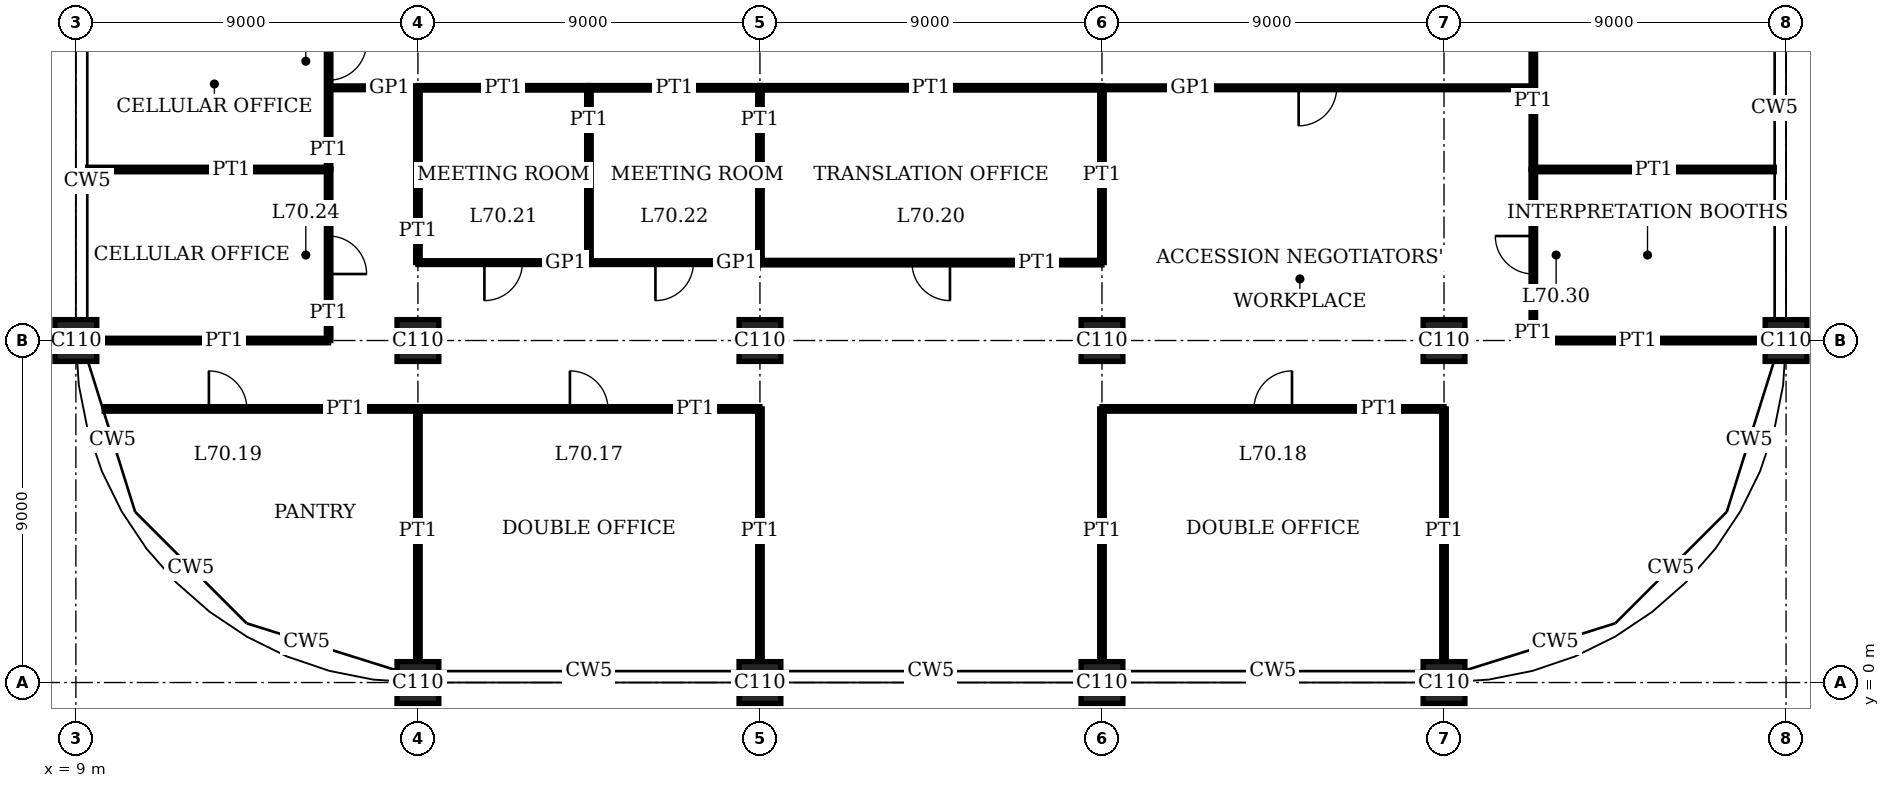
"""IFC4 building model, lengths in metres.
Left out: names, types, materials, properties, quantities, classifications, styles, units other than length and angle.
Written with IfcOpenShell. Run it as: python <this file> out.ifc"""

import sys

from ifc_helpers import new_model, si_unit, direction, frame, frame_2d, origin, origin_2d, place, context, subcontext, project, spatial, rectangle, extrude, element, fill, save


model = new_model("IFC4")
c1 = context("Model", 3, precision=1e-05, world=origin(), true_north=direction((0.0, 1.0)))
c2 = subcontext(c1, "Body", "Model", "MODEL_VIEW")
j1 = project(units=[si_unit("LENGTHUNIT", "METRE"), si_unit("PLANEANGLEUNIT", "RADIAN")], contexts=[c1])
p1 = place(None, origin())
s1 = spatial("IfcSite", under=j1, at=p1, CompositionType="ELEMENT")
p2 = place(p1, origin())
s2 = spatial("IfcBuilding", under=s1, at=p2, CompositionType="ELEMENT")
p3 = place(p2, frame((0.0, 0.0, 287.4)))
s3 = spatial("IfcBuildingStorey", under=s2, at=p3, CompositionType="ELEMENT", Elevation=287.4)
for number, where, z_axis, x_axis in (
    (1, (9.0, 9.0, 0.0), (0.0, 0.0, 1.0), (1.0, 0.0, 0.0)),
    (2, (18.0, 0.0, 0.0), (0.0, 0.0, 1.0), (1.0, 0.0, 0.0)),
    (3, (18.0, 9.0, 0.0), (0.0, 0.0, 1.0), (1.0, 0.0, 0.0)),
    (4, (27.0, 0.0, 0.0), (0.0, 0.0, 1.0), (1.0, 0.0, 0.0)),
    (5, (27.0, 9.0, 0.0), (0.0, 0.0, 1.0), (1.0, 0.0, 0.0)),
    (6, (36.0, 0.0, 0.0), (0.0, 0.0, 1.0), (1.0, 0.0, 0.0)),
    (7, (36.0, 9.0, 0.0), (0.0, 0.0, 1.0), (1.0, 0.0, 0.0)),
    (8, (45.0, 0.0, 0.0), (0.0, 0.0, 1.0), (1.0, 0.0, 0.0)),
    (9, (45.0, 9.0, 0.0), (0.0, 0.0, 1.0), (1.0, 0.0, 0.0)),
    (10, (54.0, 9.0, 0.0), (0.0, 0.0, 1.0), (1.0, 0.0, 0.0)),
):
    element("IfcColumn", number, at=place(p3, frame(where, z_axis=z_axis, x_axis=x_axis)), inside=s3, PredefinedType="COLUMN", context=c2, shape_type="SweptSolid", body=[
        extrude(rectangle(XDim=1.1, YDim=1.1, at=origin_2d()), origin(), (0.0, 0.0, 1.0), 4.0),
    ])
p4 = place(p3, frame((18.0, 7.2, 0.0), z_axis=(0.0, 0.0, 1.0), x_axis=(1.0, 0.0, 0.0)))
e11 = element("IfcWall", 11, at=p4, inside=s3, PredefinedType="PARTITIONING", context=c2, shape_type="SweptSolid", body=[
    extrude(rectangle(XDim=9.0, YDim=0.12, at=frame_2d((4.5, 0.0))), origin(), (0.0, 0.0, 1.0), 3.75),
])
p5 = place(p4, frame((4.0, 0.0, 0.0)))
e12 = element("IfcOpeningElement", 12, at=p5, cuts=e11, PredefinedType="OPENING", context=c2, shape_type="SweptSolid", body=[
    extrude(rectangle(XDim=1.0, YDim=2.4, at=frame_2d((0.5, 1.2))), frame((0.0, 0.07, 0.0), z_axis=(0.0, -1.0, 0.0), x_axis=(1.0, 0.0, 0.0)), (0.0, 0.0, 1.0), 0.14),
])
p6 = place(p3, frame((36.0, 7.2, 0.0), z_axis=(0.0, 0.0, 1.0), x_axis=(1.0, 0.0, 0.0)))
e13 = element("IfcWall", 13, at=p6, inside=s3, PredefinedType="PARTITIONING", context=c2, shape_type="SweptSolid", body=[
    extrude(rectangle(XDim=9.0, YDim=0.12, at=frame_2d((4.5, 0.0))), origin(), (0.0, 0.0, 1.0), 3.75),
])
p7 = place(p6, frame((4.0, 0.0, 0.0)))
e14 = element("IfcOpeningElement", 14, at=p7, cuts=e13, PredefinedType="OPENING", context=c2, shape_type="SweptSolid", body=[
    extrude(rectangle(XDim=1.0, YDim=2.4, at=frame_2d((0.5, 1.2))), frame((0.0, 0.07, 0.0), z_axis=(0.0, -1.0, 0.0), x_axis=(1.0, 0.0, 0.0)), (0.0, 0.0, 1.0), 0.14),
])
p8 = place(p3, frame((9.745, 7.2, 0.0), z_axis=(0.0, 0.0, 1.0), x_axis=(1.0, 0.0, 0.0)))
e15 = element("IfcWall", 15, at=p8, inside=s3, PredefinedType="PARTITIONING", context=c2, shape_type="SweptSolid", body=[
    extrude(rectangle(XDim=8.255, YDim=0.12, at=frame_2d((4.127, 0.0))), origin(), (0.0, 0.0, 1.0), 3.75),
])
p9 = place(p8, frame((2.755, 0.0, 0.0)))
e16 = element("IfcOpeningElement", 16, at=p9, cuts=e15, PredefinedType="OPENING", context=c2, shape_type="SweptSolid", body=[
    extrude(rectangle(XDim=1.0, YDim=2.4, at=frame_2d((0.5, 1.2))), frame((0.0, 0.07, 0.0), z_axis=(0.0, -1.0, 0.0), x_axis=(1.0, 0.0, 0.0)), (0.0, 0.0, 1.0), 0.14),
])
for number, where, z_axis, x_axis in (
    (17, (47.35, 9.0, 0.0), (0.0, 0.0, 1.0), (1.0, 0.0, 0.0)),
    (18, (9.55, 9.0, 0.0), (0.0, 0.0, 1.0), (1.0, 0.0, 0.0)),
):
    element("IfcWall", number, at=place(p3, frame(where, z_axis=z_axis, x_axis=x_axis)), inside=s3, PredefinedType="PARTITIONING", context=c2, shape_type="SweptSolid", body=[
        extrude(rectangle(XDim=6.1, YDim=0.12, at=frame_2d((3.05, 0.0))), origin(), (0.0, 0.0, 1.0), 3.05),
    ])
p10 = place(p3, frame((27.0, 11.05, 0.0), z_axis=(0.0, 0.0, 1.0), x_axis=(1.0, 0.0, 0.0)))
e19 = element("IfcWall", 19, at=p10, inside=s3, PredefinedType="PARTITIONING", context=c2, shape_type="SweptSolid", body=[
    extrude(rectangle(XDim=9.0, YDim=0.12, at=frame_2d((4.5, 0.0))), origin(), (0.0, 0.0, 1.0), 3.75),
])
p11 = place(p10, frame((4.0, 0.0, 0.0)))
e20 = element("IfcOpeningElement", 20, at=p11, cuts=e19, PredefinedType="OPENING", context=c2, shape_type="SweptSolid", body=[
    extrude(rectangle(XDim=1.0, YDim=2.4, at=frame_2d((0.5, 1.2))), frame((0.0, 0.07, 0.0), z_axis=(0.0, -1.0, 0.0), x_axis=(1.0, 0.0, 0.0)), (0.0, 0.0, 1.0), 0.14),
])
p12 = place(p3, frame((18.0, 11.05, 0.0), z_axis=(0.0, 0.0, 1.0), x_axis=(1.0, 0.0, 0.0)))
e21 = element("IfcWall", 21, at=p12, inside=s3, PredefinedType="PARTITIONING", context=c2, shape_type="SweptSolid", body=[
    extrude(rectangle(XDim=4.5, YDim=0.1, at=frame_2d((2.25, 0.0))), origin(), (0.0, 0.0, 1.0), 3.75),
])
p13 = place(p12, frame((1.75, 0.0, 0.0)))
e22 = element("IfcOpeningElement", 22, at=p13, cuts=e21, PredefinedType="OPENING", context=c2, shape_type="SweptSolid", body=[
    extrude(rectangle(XDim=1.0, YDim=2.4, at=frame_2d((0.5, 1.2))), frame((0.0, 0.06, 0.0), z_axis=(0.0, -1.0, 0.0), x_axis=(1.0, 0.0, 0.0)), (0.0, 0.0, 1.0), 0.12),
])
p14 = place(p3, frame((22.5, 11.05, 0.0), z_axis=(0.0, 0.0, 1.0), x_axis=(1.0, 0.0, 0.0)))
e23 = element("IfcWall", 23, at=p14, inside=s3, PredefinedType="PARTITIONING", context=c2, shape_type="SweptSolid", body=[
    extrude(rectangle(XDim=4.5, YDim=0.1, at=frame_2d((2.25, 0.0))), origin(), (0.0, 0.0, 1.0), 3.75),
])
p15 = place(p14, frame((1.75, 0.0, 0.0)))
e24 = element("IfcOpeningElement", 24, at=p15, cuts=e23, PredefinedType="OPENING", context=c2, shape_type="SweptSolid", body=[
    extrude(rectangle(XDim=1.0, YDim=2.4, at=frame_2d((0.5, 1.2))), frame((0.0, 0.06, 0.0), z_axis=(0.0, -1.0, 0.0), x_axis=(1.0, 0.0, 0.0)), (0.0, 0.0, 1.0), 0.12),
])
for number, where, z_axis, x_axis in (
    (25, (47.35, 13.5, 0.0), (0.0, 0.0, 1.0), (1.0, 0.0, 0.0)),
    (26, (9.31, 13.5, 0.0), (0.0, 0.0, 1.0), (1.0, 0.0, 0.0)),
):
    element("IfcWall", number, at=place(p3, frame(where, z_axis=z_axis, x_axis=x_axis)), inside=s3, PredefinedType="PARTITIONING", context=c2, shape_type="SweptSolid", body=[
        extrude(rectangle(XDim=6.34, YDim=0.12, at=frame_2d((3.17, 0.0))), origin(), (0.0, 0.0, 1.0), 3.1),
    ])
p16 = place(p3, frame((27.0, 15.65, 0.0), z_axis=(0.0, 0.0, 1.0), x_axis=(1.0, 0.0, 0.0)))
e27 = element("IfcWall", 27, at=p16, inside=s3, PredefinedType="PARTITIONING", context=c2, shape_type="SweptSolid", body=[
    extrude(rectangle(XDim=9.0, YDim=0.12, at=frame_2d((4.5, 0.0))), origin(), (0.0, 0.0, 1.0), 3.75),
])
for number, where, z_axis, x_axis in (
    (28, (18.0, 15.65, 0.0), (0.0, 0.0, 1.0), (1.0, 0.0, 0.0)),
    (29, (22.5, 15.65, 0.0), (0.0, 0.0, 1.0), (1.0, 0.0, 0.0)),
):
    element("IfcWall", number, at=place(p3, frame(where, z_axis=z_axis, x_axis=x_axis)), inside=s3, PredefinedType="PARTITIONING", context=c2, shape_type="SweptSolid", body=[
        extrude(rectangle(XDim=4.5, YDim=0.12, at=frame_2d((2.25, 0.0))), origin(), (0.0, 0.0, 1.0), 3.75),
    ])
p17 = place(p3, frame((36.01, 15.65, 0.0), z_axis=(0.0, 0.0, 1.0), x_axis=(1.0, 0.0, 0.0)))
e30 = element("IfcWall", 30, at=p17, inside=s3, PredefinedType="PARTITIONING", context=c2, shape_type="SweptSolid", body=[
    extrude(rectangle(XDim=11.33, YDim=0.1, at=frame_2d((5.665, 0.0))), origin(), (0.0, 0.0, 1.0), 3.75),
])
p18 = place(p17, frame((5.165, 0.0, 0.0)))
e31 = element("IfcOpeningElement", 31, at=p18, cuts=e30, PredefinedType="OPENING", context=c2, shape_type="SweptSolid", body=[
    extrude(rectangle(XDim=1.0, YDim=2.4, at=frame_2d((0.5, 1.2))), frame((0.0, 0.06, 0.0), z_axis=(0.0, -1.0, 0.0), x_axis=(1.0, 0.0, 0.0)), (0.0, 0.0, 1.0), 0.12),
])
p19 = place(p3, frame((15.66, 15.65, 0.0), z_axis=(0.0, 0.0, 1.0), x_axis=(1.0, 0.0, 0.0)))
e32 = element("IfcWall", 32, at=p19, inside=s3, PredefinedType="PARTITIONING", context=c2, shape_type="SweptSolid", body=[
    extrude(rectangle(XDim=2.33, YDim=0.1, at=frame_2d((1.165, 0.0))), origin(), (0.0, 0.0, 1.0), 3.75),
])
p20 = place(p3, frame((15.65, 9.0, 0.0), z_axis=(0.0, 0.0, 1.0), x_axis=(0.0, 1.0, 0.0)))
e33 = element("IfcWall", 33, at=p20, inside=s3, PredefinedType="PARTITIONING", context=c2, shape_type="SweptSolid", body=[
    extrude(rectangle(XDim=4.5, YDim=0.12, at=frame_2d((2.25, 0.0))), origin(), (0.0, 0.0, 1.0), 3.75),
])
p21 = place(p20, frame((1.75, 0.0, 0.0)))
e34 = element("IfcOpeningElement", 34, at=p21, cuts=e33, PredefinedType="OPENING", context=c2, shape_type="SweptSolid", body=[
    extrude(rectangle(XDim=1.0, YDim=2.4, at=frame_2d((0.5, 1.2))), frame((0.0, 0.07, 0.0), z_axis=(0.0, -1.0, 0.0), x_axis=(1.0, 0.0, 0.0)), (0.0, 0.0, 1.0), 0.14),
])
p22 = place(p3, frame((15.65, 13.5, 0.0), z_axis=(0.0, 0.0, 1.0), x_axis=(0.0, 1.0, 0.0)))
e35 = element("IfcWall", 35, at=p22, inside=s3, PredefinedType="PARTITIONING", context=c2, shape_type="SweptSolid", body=[
    extrude(rectangle(XDim=4.5, YDim=0.12, at=frame_2d((2.25, 0.0))), origin(), (0.0, 0.0, 1.0), 3.75),
])
p23 = place(p22, frame((2.35, 0.0, 0.0)))
e36 = element("IfcOpeningElement", 36, at=p23, cuts=e35, PredefinedType="OPENING", context=c2, shape_type="SweptSolid", body=[
    extrude(rectangle(XDim=1.0, YDim=2.4, at=frame_2d((0.5, 1.2))), frame((0.0, 0.07, 0.0), z_axis=(0.0, -1.0, 0.0), x_axis=(1.0, 0.0, 0.0)), (0.0, 0.0, 1.0), 0.14),
])
p24 = place(p3, frame((18.0, 0.55, 0.0), z_axis=(0.0, 0.0, 1.0), x_axis=(0.0, 1.0, 0.0)))
e37 = element("IfcWall", 37, at=p24, inside=s3, PredefinedType="PARTITIONING", context=c2, shape_type="SweptSolid", body=[
    extrude(rectangle(XDim=6.65, YDim=0.12, at=frame_2d((3.325, 0.0))), origin(), (0.0, 0.0, 1.0), 3.05),
])
p25 = place(p3, frame((18.0, 11.05, 0.0), z_axis=(0.0, 0.0, 1.0), x_axis=(0.0, 1.0, 0.0)))
e38 = element("IfcWall", 38, at=p25, inside=s3, PredefinedType="PARTITIONING", context=c2, shape_type="SweptSolid", body=[
    extrude(rectangle(XDim=4.6, YDim=0.12, at=frame_2d((2.3, 0.0))), origin(), (0.0, 0.0, 1.0), 3.05),
])
p26 = place(p3, frame((22.5, 11.05, 0.0), z_axis=(0.0, 0.0, 1.0), x_axis=(0.0, 1.0, 0.0)))
e39 = element("IfcWall", 39, at=p26, inside=s3, PredefinedType="PARTITIONING", context=c2, shape_type="SweptSolid", body=[
    extrude(rectangle(XDim=4.6, YDim=0.12, at=frame_2d((2.3, 0.0))), origin(), (0.0, 0.0, 1.0), 3.75),
])
p27 = place(p3, frame((27.0, 0.55, 0.0), z_axis=(0.0, 0.0, 1.0), x_axis=(0.0, 1.0, 0.0)))
e40 = element("IfcWall", 40, at=p27, inside=s3, PredefinedType="PARTITIONING", context=c2, shape_type="SweptSolid", body=[
    extrude(rectangle(XDim=6.65, YDim=0.12, at=frame_2d((3.325, 0.0))), origin(), (0.0, 0.0, 1.0), 3.05),
])
p28 = place(p3, frame((27.0, 11.05, 0.0), z_axis=(0.0, 0.0, 1.0), x_axis=(0.0, 1.0, 0.0)))
e41 = element("IfcWall", 41, at=p28, inside=s3, PredefinedType="PARTITIONING", context=c2, shape_type="SweptSolid", body=[
    extrude(rectangle(XDim=4.6, YDim=0.12, at=frame_2d((2.3, 0.0))), origin(), (0.0, 0.0, 1.0), 3.05),
])
p29 = place(p3, frame((36.0, 0.55, 0.0), z_axis=(0.0, 0.0, 1.0), x_axis=(0.0, 1.0, 0.0)))
e42 = element("IfcWall", 42, at=p29, inside=s3, PredefinedType="PARTITIONING", context=c2, shape_type="SweptSolid", body=[
    extrude(rectangle(XDim=6.65, YDim=0.12, at=frame_2d((3.325, 0.0))), origin(), (0.0, 0.0, 1.0), 3.05),
])
p30 = place(p3, frame((36.0, 11.05, 0.0), z_axis=(0.0, 0.0, 1.0), x_axis=(0.0, 1.0, 0.0)))
e43 = element("IfcWall", 43, at=p30, inside=s3, PredefinedType="PARTITIONING", context=c2, shape_type="SweptSolid", body=[
    extrude(rectangle(XDim=4.6, YDim=0.12, at=frame_2d((2.3, 0.0))), origin(), (0.0, 0.0, 1.0), 3.05),
])
p31 = place(p3, frame((45.0, 0.55, 0.0), z_axis=(0.0, 0.0, 1.0), x_axis=(0.0, 1.0, 0.0)))
e44 = element("IfcWall", 44, at=p31, inside=s3, PredefinedType="PARTITIONING", context=c2, shape_type="SweptSolid", body=[
    extrude(rectangle(XDim=6.65, YDim=0.12, at=frame_2d((3.325, 0.0))), origin(), (0.0, 0.0, 1.0), 3.05),
])
p32 = place(p3, frame((47.35, 9.0, 0.0), z_axis=(0.0, 0.0, 1.0), x_axis=(0.0, 1.0, 0.0)))
e45 = element("IfcWall", 45, at=p32, inside=s3, PredefinedType="PARTITIONING", context=c2, shape_type="SweptSolid", body=[
    extrude(rectangle(XDim=4.5, YDim=0.12, at=frame_2d((2.25, 0.0))), origin(), (0.0, 0.0, 1.0), 3.75),
])
p33 = place(p32, frame((1.75, 0.0, 0.0)))
e46 = element("IfcOpeningElement", 46, at=p33, cuts=e45, PredefinedType="OPENING", context=c2, shape_type="SweptSolid", body=[
    extrude(rectangle(XDim=1.0, YDim=2.4, at=frame_2d((0.5, 1.2))), frame((0.0, 0.07, 0.0), z_axis=(0.0, -1.0, 0.0), x_axis=(1.0, 0.0, 0.0)), (0.0, 0.0, 1.0), 0.14),
])
p34 = place(p3, frame((47.35, 13.5, 0.0), z_axis=(0.0, 0.0, 1.0), x_axis=(0.0, 1.0, 0.0)))
e47 = element("IfcWall", 47, at=p34, inside=s3, PredefinedType="PARTITIONING", context=c2, shape_type="SweptSolid", body=[
    extrude(rectangle(XDim=9.0, YDim=0.12, at=frame_2d((4.5, 0.0))), origin(), (0.0, 0.0, 1.0), 3.75),
])
p35 = place(p34, frame((4.0, 0.0, 0.0)))
e48 = element("IfcOpeningElement", 48, at=p35, cuts=e47, PredefinedType="OPENING", context=c2, shape_type="SweptSolid", body=[
    extrude(rectangle(XDim=1.0, YDim=2.4, at=frame_2d((0.5, 1.2))), frame((0.0, 0.07, 0.0), z_axis=(0.0, -1.0, 0.0), x_axis=(1.0, 0.0, 0.0)), (0.0, 0.0, 1.0), 0.14),
])
p36 = place(p5, origin())
e49 = element("IfcDoor", 49, at=p36, inside=s3, OperationType="SINGLE_SWING_RIGHT", PredefinedType="DOOR", context=c2, shape_type="SweptSolid", body=[
    extrude(rectangle(XDim=1.0, YDim=2.4, at=frame_2d((0.5, 1.2))), frame((0.0, 0.025, 0.0), z_axis=(0.0, -1.0, 0.0), x_axis=(1.0, 0.0, 0.0)), (0.0, 0.0, 1.0), 0.05),
])
fill(e12, e49)
p37 = place(p7, origin())
e50 = element("IfcDoor", 50, at=p37, inside=s3, OperationType="SINGLE_SWING_LEFT", PredefinedType="DOOR", context=c2, shape_type="SweptSolid", body=[
    extrude(rectangle(XDim=1.0, YDim=2.4, at=frame_2d((0.5, 1.2))), frame((0.0, 0.025, 0.0), z_axis=(0.0, -1.0, 0.0), x_axis=(1.0, 0.0, 0.0)), (0.0, 0.0, 1.0), 0.05),
])
fill(e14, e50)
p38 = place(p9, origin())
e51 = element("IfcDoor", 51, at=p38, inside=s3, OperationType="SINGLE_SWING_RIGHT", PredefinedType="DOOR", context=c2, shape_type="SweptSolid", body=[
    extrude(rectangle(XDim=1.0, YDim=2.4, at=frame_2d((0.5, 1.2))), frame((0.0, 0.025, 0.0), z_axis=(0.0, -1.0, 0.0), x_axis=(1.0, 0.0, 0.0)), (0.0, 0.0, 1.0), 0.05),
])
fill(e16, e51)
p39 = place(p11, origin())
e52 = element("IfcDoor", 52, at=p39, inside=s3, OperationType="SINGLE_SWING_RIGHT", PredefinedType="DOOR", context=c2, shape_type="SweptSolid", body=[
    extrude(rectangle(XDim=1.0, YDim=2.4, at=frame_2d((0.5, 1.2))), frame((0.0, 0.025, 0.0), z_axis=(0.0, -1.0, 0.0), x_axis=(1.0, 0.0, 0.0)), (0.0, 0.0, 1.0), 0.05),
])
fill(e20, e52)
p40 = place(p13, origin())
e53 = element("IfcDoor", 53, at=p40, inside=s3, OperationType="SINGLE_SWING_LEFT", PredefinedType="DOOR", context=c2, shape_type="SweptSolid", body=[
    extrude(rectangle(XDim=1.0, YDim=2.4, at=frame_2d((0.5, 1.2))), frame((0.0, 0.02, 0.0), z_axis=(0.0, -1.0, 0.0), x_axis=(1.0, 0.0, 0.0)), (0.0, 0.0, 1.0), 0.04),
])
fill(e22, e53)
p41 = place(p15, origin())
e54 = element("IfcDoor", 54, at=p41, inside=s3, OperationType="SINGLE_SWING_LEFT", PredefinedType="DOOR", context=c2, shape_type="SweptSolid", body=[
    extrude(rectangle(XDim=1.0, YDim=2.4, at=frame_2d((0.5, 1.2))), frame((0.0, 0.02, 0.0), z_axis=(0.0, -1.0, 0.0), x_axis=(1.0, 0.0, 0.0)), (0.0, 0.0, 1.0), 0.04),
])
fill(e24, e54)
p42 = place(p18, origin())
e55 = element("IfcDoor", 55, at=p42, inside=s3, OperationType="SINGLE_SWING_LEFT", PredefinedType="DOOR", context=c2, shape_type="SweptSolid", body=[
    extrude(rectangle(XDim=1.0, YDim=2.4, at=frame_2d((0.5, 1.2))), frame((0.0, 0.02, 0.0), z_axis=(0.0, -1.0, 0.0), x_axis=(1.0, 0.0, 0.0)), (0.0, 0.0, 1.0), 0.04),
])
fill(e31, e55)
p43 = place(p21, origin())
e56 = element("IfcDoor", 56, at=p43, inside=s3, OperationType="SINGLE_SWING_LEFT", PredefinedType="DOOR", context=c2, shape_type="SweptSolid", body=[
    extrude(rectangle(XDim=1.0, YDim=2.4, at=frame_2d((0.5, 1.2))), frame((0.0, 0.025, 0.0), z_axis=(0.0, -1.0, 0.0), x_axis=(1.0, 0.0, 0.0)), (0.0, 0.0, 1.0), 0.05),
])
fill(e34, e56)
p44 = place(p23, origin())
e57 = element("IfcDoor", 57, at=p44, inside=s3, OperationType="SINGLE_SWING_RIGHT", PredefinedType="DOOR", context=c2, shape_type="SweptSolid", body=[
    extrude(rectangle(XDim=1.0, YDim=2.4, at=frame_2d((0.5, 1.2))), frame((0.0, 0.025, 0.0), z_axis=(0.0, -1.0, 0.0), x_axis=(1.0, 0.0, 0.0)), (0.0, 0.0, 1.0), 0.05),
])
fill(e36, e57)
p45 = place(p33, origin())
e58 = element("IfcDoor", 58, at=p45, inside=s3, OperationType="SINGLE_SWING_LEFT", PredefinedType="DOOR", context=c2, shape_type="SweptSolid", body=[
    extrude(rectangle(XDim=1.0, YDim=2.4, at=frame_2d((0.5, 1.2))), frame((0.0, 0.025, 0.0), z_axis=(0.0, -1.0, 0.0), x_axis=(1.0, 0.0, 0.0)), (0.0, 0.0, 1.0), 0.05),
])
fill(e46, e58)
save(model, sys.argv[1])
